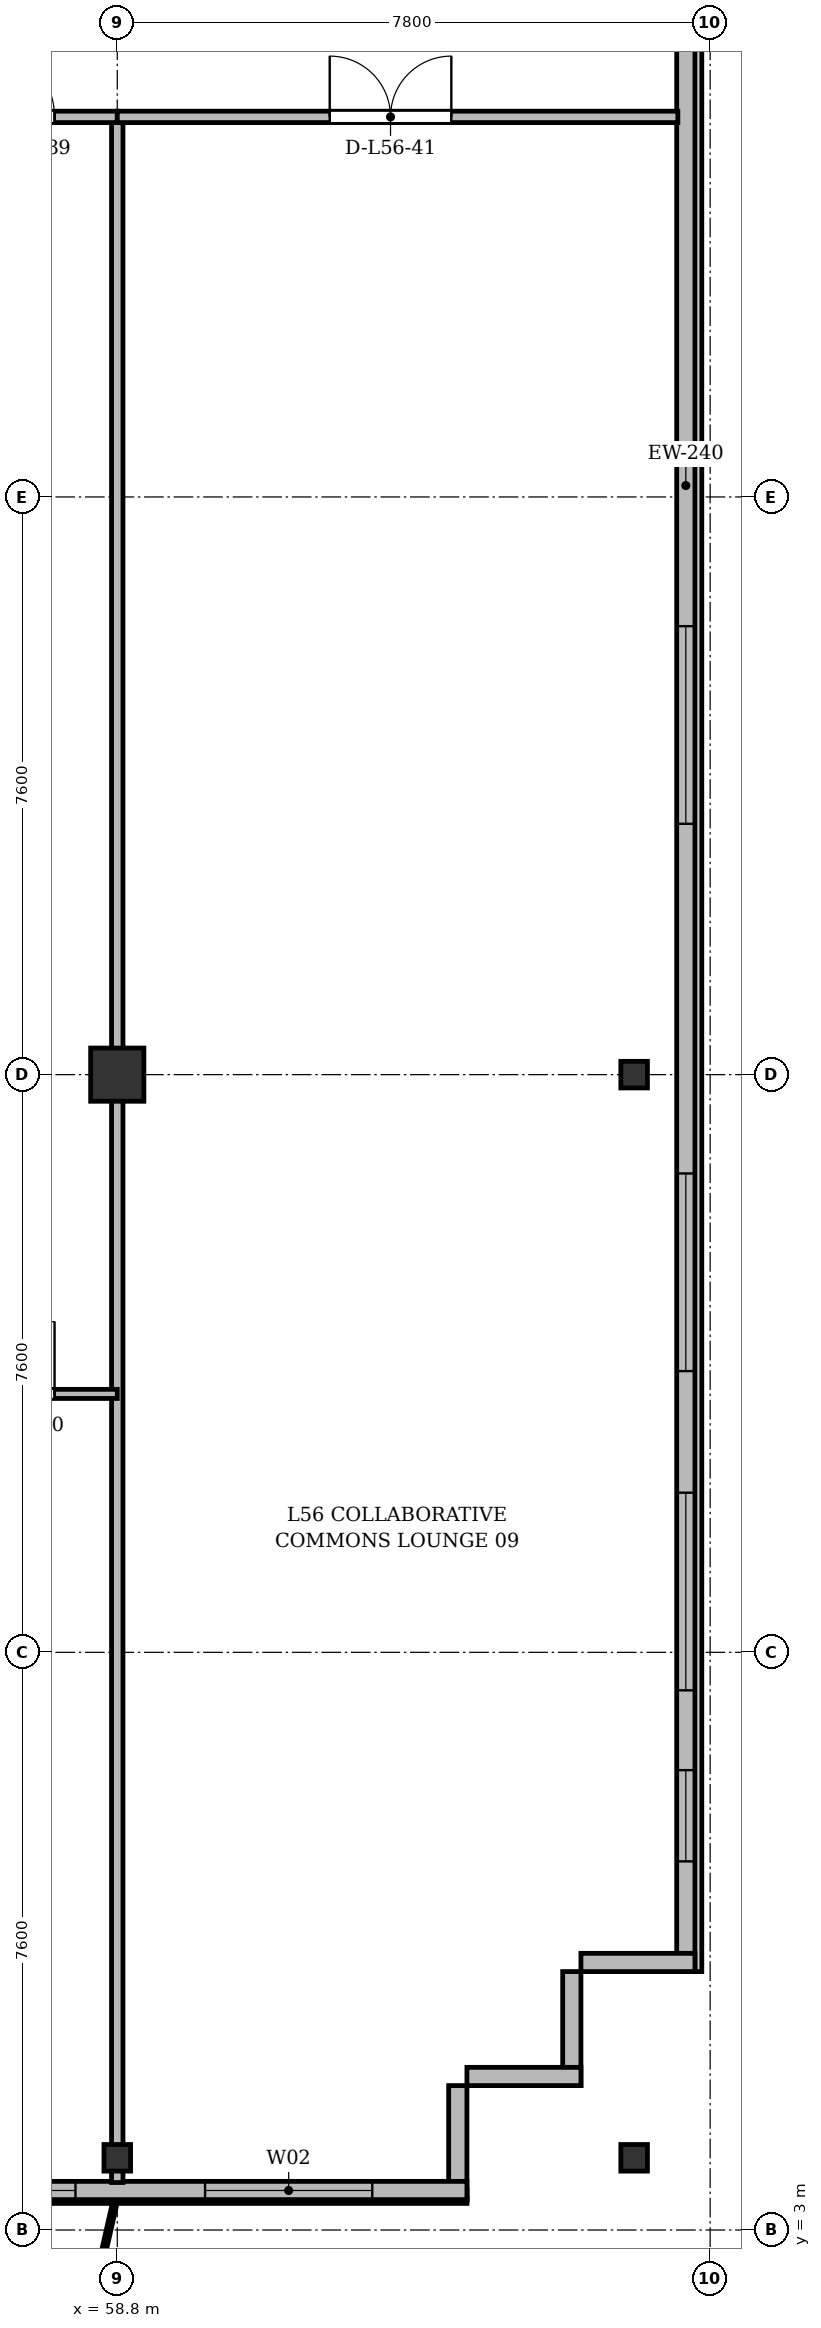
"""IFC4 building model, lengths in metres.
Left out: names, types, materials, properties, quantities, classifications, styles, units other than length and angle.
Written with IfcOpenShell. Run it as: python <this file> out.ifc"""

import sys

from ifc_helpers import new_model, si_unit, direction, frame, frame_2d, origin, origin_2d, place, context, subcontext, project, spatial, rectangle, i_section, extrude, source, transform, mapped, element, fill, save


model = new_model("IFC4")
c1 = context("Model", 3, precision=1e-05, world=origin(), true_north=direction((0.0, 1.0)))
c2 = subcontext(c1, "Body", "Model", "MODEL_VIEW")
j1 = project(units=[si_unit("LENGTHUNIT", "METRE"), si_unit("PLANEANGLEUNIT", "RADIAN")], contexts=[c1])
p1 = place(None, origin())
s1 = spatial("IfcSite", under=j1, at=p1, CompositionType="ELEMENT")
p2 = place(p1, origin())
s2 = spatial("IfcBuilding", under=s1, at=p2, CompositionType="ELEMENT")
p3 = place(p2, frame((0.0, 0.0, 215.7)))
s3 = spatial("IfcBuildingStorey", under=s2, at=p3, CompositionType="ELEMENT", Elevation=215.7)
m1 = source(origin(), c2, "Body", "SweptSolid", [
    extrude(i_section(OverallWidth=0.35, OverallDepth=0.35, WebThickness=0.018, FlangeThickness=0.028, at=origin_2d()), origin(), (0.0, 0.0, 1.0), 3.6),
])
p4 = place(p3, frame((58.8, 3.95, 0.0), z_axis=(0.0, 0.0, 1.0), x_axis=(1.0, 0.0, 0.0)))
e1 = element("IfcColumn", 1, at=p4, inside=s3, PredefinedType="COLUMN", context=c2, shape_type="MappedRepresentation", body=[
    mapped(m1, transform((0.0, 0.0, 0.0), x_axis=(1.0, 0.0, 0.0), y_axis=(0.0, 1.0, 0.0), z_axis=(0.0, 0.0, 1.0), scale=1.0)),
])
m2 = source(origin(), c2, "Body", "SweptSolid", [
    extrude(rectangle(XDim=0.7, YDim=0.7, at=origin_2d()), origin(), (0.0, 0.0, 1.0), 3.6),
])
p5 = place(p3, frame((58.8, 18.2, 0.0), z_axis=(0.0, 0.0, 1.0), x_axis=(1.0, 0.0, 0.0)))
e2 = element("IfcColumn", 2, at=p5, inside=s3, PredefinedType="COLUMN", context=c2, shape_type="MappedRepresentation", body=[
    mapped(m2, transform((0.0, 0.0, 0.0), x_axis=(1.0, 0.0, 0.0), y_axis=(0.0, 1.0, 0.0), z_axis=(0.0, 0.0, 1.0), scale=1.0)),
])
for number, where, z_axis, x_axis in (
    (3, (65.6, 3.95, 0.0), (0.0, 0.0, 1.0), (1.0, 0.0, 0.0)),
    (4, (65.6, 18.2, 0.0), (0.0, 0.0, 1.0), (1.0, 0.0, 0.0)),
):
    element("IfcColumn", number, at=place(p3, frame(where, z_axis=z_axis, x_axis=x_axis)), inside=s3, PredefinedType="COLUMN", context=c2, shape_type="MappedRepresentation", body=[
        mapped(m1, transform((0.0, 0.0, 0.0), x_axis=(1.0, 0.0, 0.0), y_axis=(0.0, 1.0, 0.0), z_axis=(0.0, 0.0, 1.0), scale=1.0)),
    ])
p6 = place(p3, frame((66.28, 45.5, 0.0), z_axis=(0.0, 0.0, 1.0), x_axis=(0.0, -1.0, 0.0)))
e5 = element("IfcWall", 5, at=p6, inside=s3, PredefinedType="SOLIDWALL", context=c2, shape_type="SweptSolid", body=[
    extrude(rectangle(XDim=39.1, YDim=0.24, at=frame_2d((19.55, 0.0))), origin(), (0.0, 0.0, 1.0), 3.36),
])
p7 = place(p6, frame((36.45, 0.0, 0.92)))
e6 = element("IfcOpeningElement", 6, at=p7, cuts=e5, PredefinedType="OPENING", context=c2, shape_type="SweptSolid", body=[
    extrude(rectangle(XDim=1.2, YDim=1.65, at=frame_2d((0.6, 0.825))), frame((0.0, 0.13, 0.0), z_axis=(0.0, -1.0, 0.0), x_axis=(1.0, 0.0, 0.0)), (0.0, 0.0, 1.0), 0.26),
])
p8 = place(p6, frame((32.8, 0.0, 0.92)))
e7 = element("IfcOpeningElement", 7, at=p8, cuts=e5, PredefinedType="OPENING", context=c2, shape_type="SweptSolid", body=[
    extrude(rectangle(XDim=2.6, YDim=1.9, at=frame_2d((1.3, 0.95))), frame((0.0, 0.13, 0.0), z_axis=(0.0, -1.0, 0.0), x_axis=(1.0, 0.0, 0.0)), (0.0, 0.0, 1.0), 0.26),
])
p9 = place(p6, frame((28.6, 0.0, 0.92)))
e8 = element("IfcOpeningElement", 8, at=p9, cuts=e5, PredefinedType="OPENING", context=c2, shape_type="SweptSolid", body=[
    extrude(rectangle(XDim=2.6, YDim=1.9, at=frame_2d((1.3, 0.95))), frame((0.0, 0.13, 0.0), z_axis=(0.0, -1.0, 0.0), x_axis=(1.0, 0.0, 0.0)), (0.0, 0.0, 1.0), 0.26),
])
p10 = place(p6, frame((21.4, 0.0, 0.92)))
e9 = element("IfcOpeningElement", 9, at=p10, cuts=e5, PredefinedType="OPENING", context=c2, shape_type="SweptSolid", body=[
    extrude(rectangle(XDim=2.6, YDim=1.9, at=frame_2d((1.3, 0.95))), frame((0.0, 0.13, 0.0), z_axis=(0.0, -1.0, 0.0), x_axis=(1.0, 0.0, 0.0)), (0.0, 0.0, 1.0), 0.26),
])
p11 = place(p6, frame((7.4, 0.0, 0.92)))
e10 = element("IfcOpeningElement", 10, at=p11, cuts=e5, PredefinedType="OPENING", context=c2, shape_type="SweptSolid", body=[
    extrude(rectangle(XDim=2.6, YDim=1.9, at=frame_2d((1.3, 0.95))), frame((0.0, 0.13, 0.0), z_axis=(0.0, -1.0, 0.0), x_axis=(1.0, 0.0, 0.0)), (0.0, 0.0, 1.0), 0.26),
])
p12 = place(p6, frame((4.5, 0.0, 0.92)))
e11 = element("IfcOpeningElement", 11, at=p12, cuts=e5, PredefinedType="OPENING", context=c2, shape_type="SweptSolid", body=[
    extrude(rectangle(XDim=1.2, YDim=1.65, at=frame_2d((0.6, 0.825))), frame((0.0, 0.13, 0.0), z_axis=(0.0, -1.0, 0.0), x_axis=(1.0, 0.0, 0.0)), (0.0, 0.0, 1.0), 0.26),
])
p13 = place(p6, frame((1.15, 0.0, 0.92)))
e12 = element("IfcOpeningElement", 12, at=p13, cuts=e5, PredefinedType="OPENING", context=c2, shape_type="SweptSolid", body=[
    extrude(rectangle(XDim=1.2, YDim=1.65, at=frame_2d((0.6, 0.825))), frame((0.0, 0.13, 0.0), z_axis=(0.0, -1.0, 0.0), x_axis=(1.0, 0.0, 0.0)), (0.0, 0.0, 1.0), 0.26),
])
p14 = place(p3, frame((66.4, 6.52, 0.0), z_axis=(0.0, 0.0, 1.0), x_axis=(-1.0, 0.0, 0.0)))
e13 = element("IfcWall", 13, at=p14, inside=s3, PredefinedType="SOLIDWALL", context=c2, shape_type="SweptSolid", body=[
    extrude(rectangle(XDim=1.5, YDim=0.24, at=frame_2d((0.75, 0.0))), origin(), (0.0, 0.0, 1.0), 2.86),
])
for number, where, z_axis, x_axis in (
    (14, (64.78, 6.4, 0.0), (0.0, 0.0, 1.0), (0.0, -1.0, 0.0)),
    (15, (64.9, 5.02, 0.0), (0.0, 0.0, 1.0), (-1.0, 0.0, 0.0)),
):
    element("IfcWall", number, at=place(p3, frame(where, z_axis=z_axis, x_axis=x_axis)), inside=s3, PredefinedType="SOLIDWALL", context=c2, shape_type="SweptSolid", body=[
        extrude(rectangle(XDim=1.5, YDim=0.24, at=frame_2d((0.75, 0.0))), origin(), (0.0, 0.0, 1.0), 3.36),
    ])
p15 = place(p3, frame((63.28, 4.9, 0.0), z_axis=(0.0, 0.0, 1.0), x_axis=(0.0, -1.0, 0.0)))
e16 = element("IfcWall", 16, at=p15, inside=s3, PredefinedType="SOLIDWALL", context=c2, shape_type="SweptSolid", body=[
    extrude(rectangle(XDim=1.5, YDim=0.24, at=frame_2d((0.75, 0.0))), origin(), (0.0, 0.0, 1.0), 2.91),
])
p16 = place(p3, frame((63.4, 3.52, 0.0), z_axis=(0.0, 0.0, 1.0), x_axis=(-1.0, 0.0, 0.0)))
e17 = element("IfcWall", 17, at=p16, inside=s3, PredefinedType="SOLIDWALL", context=c2, shape_type="SweptSolid", body=[
    extrude(rectangle(XDim=52.4, YDim=0.24, at=frame_2d((26.2, 0.0))), origin(), (0.0, 0.0, 1.0), 3.36),
])
p17 = place(p16, frame((1.245, 0.0, 0.9)))
e18 = element("IfcOpeningElement", 18, at=p17, cuts=e17, PredefinedType="OPENING", context=c2, shape_type="SweptSolid", body=[
    extrude(rectangle(XDim=2.2, YDim=1.8, at=frame_2d((1.1, 0.9))), frame((0.0, 0.13, 0.0), z_axis=(0.0, -1.0, 0.0), x_axis=(1.0, 0.0, 0.0)), (0.0, 0.0, 1.0), 0.26),
])
p18 = place(p16, frame((5.15, 0.0, 0.9)))
e19 = element("IfcOpeningElement", 19, at=p18, cuts=e17, PredefinedType="OPENING", context=c2, shape_type="SweptSolid", body=[
    extrude(rectangle(XDim=1.5, YDim=1.75, at=frame_2d((0.75, 0.875))), frame((0.0, 0.13, 0.0), z_axis=(0.0, -1.0, 0.0), x_axis=(1.0, 0.0, 0.0)), (0.0, 0.0, 1.0), 0.26),
])
p19 = place(p16, frame((7.45, 0.0, 0.9)))
e20 = element("IfcOpeningElement", 20, at=p19, cuts=e17, PredefinedType="OPENING", context=c2, shape_type="SweptSolid", body=[
    extrude(rectangle(XDim=1.5, YDim=1.75, at=frame_2d((0.75, 0.875))), frame((0.0, 0.13, 0.0), z_axis=(0.0, -1.0, 0.0), x_axis=(1.0, 0.0, 0.0)), (0.0, 0.0, 1.0), 0.26),
])
p20 = place(p16, frame((13.575, 0.0, 0.9)))
e21 = element("IfcOpeningElement", 21, at=p20, cuts=e17, PredefinedType="OPENING", context=c2, shape_type="SweptSolid", body=[
    extrude(rectangle(XDim=1.65, YDim=1.85, at=frame_2d((0.825, 0.925))), frame((0.0, 0.13, 0.0), z_axis=(0.0, -1.0, 0.0), x_axis=(1.0, 0.0, 0.0)), (0.0, 0.0, 1.0), 0.26),
])
p21 = place(p16, frame((25.3, 0.0, 0.9)))
e22 = element("IfcOpeningElement", 22, at=p21, cuts=e17, PredefinedType="OPENING", context=c2, shape_type="SweptSolid", body=[
    extrude(rectangle(XDim=1.8, YDim=1.8, at=frame_2d((0.9, 0.9))), frame((0.0, 0.13, 0.0), z_axis=(0.0, -1.0, 0.0), x_axis=(1.0, 0.0, 0.0)), (0.0, 0.0, 1.0), 0.26),
])
p22 = place(p16, frame((36.9, 0.0, 0.9)))
e23 = element("IfcOpeningElement", 23, at=p22, cuts=e17, PredefinedType="OPENING", context=c2, shape_type="SweptSolid", body=[
    extrude(rectangle(XDim=2.2, YDim=1.8, at=frame_2d((1.1, 0.9))), frame((0.0, 0.13, 0.0), z_axis=(0.0, -1.0, 0.0), x_axis=(1.0, 0.0, 0.0)), (0.0, 0.0, 1.0), 0.26),
])
p23 = place(p16, frame((43.45, 0.0, 0.9)))
e24 = element("IfcOpeningElement", 24, at=p23, cuts=e17, PredefinedType="OPENING", context=c2, shape_type="SweptSolid", body=[
    extrude(rectangle(XDim=1.5, YDim=1.75, at=frame_2d((0.75, 0.875))), frame((0.0, 0.13, 0.0), z_axis=(0.0, -1.0, 0.0), x_axis=(1.0, 0.0, 0.0)), (0.0, 0.0, 1.0), 0.26),
])
p24 = place(p16, frame((45.5, 0.0, 0.9)))
e25 = element("IfcOpeningElement", 25, at=p24, cuts=e17, PredefinedType="OPENING", context=c2, shape_type="SweptSolid", body=[
    extrude(rectangle(XDim=2.0, YDim=1.95, at=frame_2d((1.0, 0.975))), frame((0.0, 0.13, 0.0), z_axis=(0.0, -1.0, 0.0), x_axis=(1.0, 0.0, 0.0)), (0.0, 0.0, 1.0), 0.26),
])
p25 = place(p16, frame((49.23, 0.0, 0.9)))
e26 = element("IfcOpeningElement", 26, at=p25, cuts=e17, PredefinedType="OPENING", context=c2, shape_type="SweptSolid", body=[
    extrude(rectangle(XDim=1.65, YDim=1.85, at=frame_2d((0.825, 0.925))), frame((0.0, 0.13, 0.0), z_axis=(0.0, -1.0, 0.0), x_axis=(1.0, 0.0, 0.0)), (0.0, 0.0, 1.0), 0.26),
])
p26 = place(p3, frame((58.8, 3.625, 0.0), z_axis=(0.0, 0.0, 1.0), x_axis=(0.0, 1.0, 0.0)))
e27 = element("IfcWall", 27, at=p26, inside=s3, PredefinedType="PARTITIONING", context=c2, shape_type="SweptSolid", body=[
    extrude(rectangle(XDim=27.175, YDim=0.15, at=frame_2d((13.587, 0.0))), origin(), (0.0, 0.0, 1.0), 2.86),
])
p27 = place(p3, frame((56.2, 30.8, 0.0), z_axis=(0.0, 0.0, 1.0), x_axis=(1.0, 0.0, 0.0)))
e28 = element("IfcWall", 28, at=p27, inside=s3, PredefinedType="PARTITIONING", context=c2, shape_type="SweptSolid", body=[
    extrude(rectangle(XDim=2.6, YDim=0.15, at=frame_2d((1.3, 0.0))), origin(), (0.0, 0.0, 1.0), 2.86),
])
p28 = place(p27, frame((0.825, 0.0, 0.0)))
e29 = element("IfcOpeningElement", 29, at=p28, cuts=e28, PredefinedType="OPENING", context=c2, shape_type="SweptSolid", body=[
    extrude(rectangle(XDim=0.95, YDim=2.15, at=frame_2d((0.475, 1.075))), frame((0.0, 0.085, 0.0), z_axis=(0.0, -1.0, 0.0), x_axis=(1.0, 0.0, 0.0)), (0.0, 0.0, 1.0), 0.17),
])
p29 = place(p3, frame((56.2, 14.0, 0.0), z_axis=(0.0, 0.0, 1.0), x_axis=(1.0, 0.0, 0.0)))
e30 = element("IfcWall", 30, at=p29, inside=s3, PredefinedType="PARTITIONING", context=c2, shape_type="SweptSolid", body=[
    extrude(rectangle(XDim=2.6, YDim=0.12, at=frame_2d((1.3, 0.0))), origin(), (0.0, 0.0, 1.0), 2.86),
])
p30 = place(p29, frame((0.825, 0.0, 0.0)))
e31 = element("IfcOpeningElement", 31, at=p30, cuts=e30, PredefinedType="OPENING", context=c2, shape_type="SweptSolid", body=[
    extrude(rectangle(XDim=0.95, YDim=2.15, at=frame_2d((0.475, 1.075))), frame((0.0, 0.07, 0.0), z_axis=(0.0, -1.0, 0.0), x_axis=(1.0, 0.0, 0.0)), (0.0, 0.0, 1.0), 0.14),
])
p31 = place(p3, frame((58.8, 30.8, 0.0), z_axis=(0.0, 0.0, 1.0), x_axis=(1.0, 0.0, 0.0)))
e32 = element("IfcWall", 32, at=p31, inside=s3, PredefinedType="PARTITIONING", context=c2, shape_type="SweptSolid", body=[
    extrude(rectangle(XDim=7.375, YDim=0.15, at=frame_2d((3.688, 0.0))), origin(), (0.0, 0.0, 1.0), 2.86),
])
p32 = place(p31, frame((2.795, 0.0, 0.0)))
e33 = element("IfcOpeningElement", 33, at=p32, cuts=e32, PredefinedType="OPENING", context=c2, shape_type="SweptSolid", body=[
    extrude(rectangle(XDim=1.6, YDim=2.2, at=frame_2d((0.8, 1.1))), frame((0.0, 0.085, 0.0), z_axis=(0.0, -1.0, 0.0), x_axis=(1.0, 0.0, 0.0)), (0.0, 0.0, 1.0), 0.17),
])
m3 = source(origin(), c2, "Body", "SweptSolid", [
    extrude(rectangle(XDim=1.2, YDim=1.65, at=frame_2d((0.6, 0.825))), frame((0.0, 0.03, 0.0), z_axis=(0.0, -1.0, 0.0), x_axis=(1.0, 0.0, 0.0)), (0.0, 0.0, 1.0), 0.06),
])
p33 = place(p7, origin())
e34 = element("IfcWindow", 34, at=p33, inside=s3, PartitioningType="SINGLE_PANEL", PredefinedType="WINDOW", context=c2, shape_type="MappedRepresentation", body=[
    mapped(m3, transform((0.0, 0.0, 0.0), x_axis=(1.0, 0.0, 0.0), y_axis=(0.0, 1.0, 0.0), z_axis=(0.0, 0.0, 1.0), scale=1.0)),
])
fill(e6, e34)
m4 = source(origin(), c2, "Body", "SweptSolid", [
    extrude(rectangle(XDim=2.6, YDim=1.9, at=frame_2d((1.3, 0.95))), frame((0.0, 0.03, 0.0), z_axis=(0.0, -1.0, 0.0), x_axis=(1.0, 0.0, 0.0)), (0.0, 0.0, 1.0), 0.06),
])
p34 = place(p8, origin())
e35 = element("IfcWindow", 35, at=p34, inside=s3, PartitioningType="SINGLE_PANEL", PredefinedType="WINDOW", context=c2, shape_type="MappedRepresentation", body=[
    mapped(m4, transform((0.0, 0.0, 0.0), x_axis=(1.0, 0.0, 0.0), y_axis=(0.0, 1.0, 0.0), z_axis=(0.0, 0.0, 1.0), scale=1.0)),
])
fill(e7, e35)
p35 = place(p9, origin())
e36 = element("IfcWindow", 36, at=p35, inside=s3, PartitioningType="SINGLE_PANEL", PredefinedType="WINDOW", context=c2, shape_type="MappedRepresentation", body=[
    mapped(m4, transform((0.0, 0.0, 0.0), x_axis=(1.0, 0.0, 0.0), y_axis=(0.0, 1.0, 0.0), z_axis=(0.0, 0.0, 1.0), scale=1.0)),
])
fill(e8, e36)
p36 = place(p10, origin())
e37 = element("IfcWindow", 37, at=p36, inside=s3, PartitioningType="SINGLE_PANEL", PredefinedType="WINDOW", context=c2, shape_type="MappedRepresentation", body=[
    mapped(m4, transform((0.0, 0.0, 0.0), x_axis=(1.0, 0.0, 0.0), y_axis=(0.0, 1.0, 0.0), z_axis=(0.0, 0.0, 1.0), scale=1.0)),
])
fill(e9, e37)
m5 = source(origin(), c2, "Body", "SweptSolid", [
    extrude(rectangle(XDim=2.2, YDim=1.8, at=frame_2d((1.1, 0.9))), frame((0.0, 0.03, 0.0), z_axis=(0.0, -1.0, 0.0), x_axis=(1.0, 0.0, 0.0)), (0.0, 0.0, 1.0), 0.06),
])
p37 = place(p17, origin())
e38 = element("IfcWindow", 38, at=p37, inside=s3, PartitioningType="SINGLE_PANEL", PredefinedType="WINDOW", context=c2, shape_type="MappedRepresentation", body=[
    mapped(m5, transform((0.0, 0.0, 0.0), x_axis=(1.0, 0.0, 0.0), y_axis=(0.0, 1.0, 0.0), z_axis=(0.0, 0.0, 1.0), scale=1.0)),
])
fill(e18, e38)
m6 = source(origin(), c2, "Body", "SweptSolid", [
    extrude(rectangle(XDim=1.5, YDim=1.75, at=frame_2d((0.75, 0.875))), frame((0.0, 0.03, 0.0), z_axis=(0.0, -1.0, 0.0), x_axis=(1.0, 0.0, 0.0)), (0.0, 0.0, 1.0), 0.06),
])
p38 = place(p18, origin())
e39 = element("IfcWindow", 39, at=p38, inside=s3, PartitioningType="SINGLE_PANEL", PredefinedType="WINDOW", context=c2, shape_type="MappedRepresentation", body=[
    mapped(m6, transform((0.0, 0.0, 0.0), x_axis=(1.0, 0.0, 0.0), y_axis=(0.0, 1.0, 0.0), z_axis=(0.0, 0.0, 1.0), scale=1.0)),
])
fill(e19, e39)
m7 = source(origin(), c2, "Body", "SweptSolid", [
    extrude(rectangle(XDim=0.95, YDim=2.15, at=frame_2d((0.475, 1.075))), frame((0.0, 0.025, 0.0), z_axis=(0.0, -1.0, 0.0), x_axis=(1.0, 0.0, 0.0)), (0.0, 0.0, 1.0), 0.05),
])
p39 = place(p28, origin())
e40 = element("IfcDoor", 40, at=p39, inside=s3, OperationType="SINGLE_SWING_LEFT", PredefinedType="DOOR", context=c2, shape_type="MappedRepresentation", body=[
    mapped(m7, transform((0.0, 0.0, 0.0), x_axis=(1.0, 0.0, 0.0), y_axis=(0.0, 1.0, 0.0), z_axis=(0.0, 0.0, 1.0), scale=1.0)),
])
fill(e29, e40)
p40 = place(p30, origin())
e41 = element("IfcDoor", 41, at=p40, inside=s3, OperationType="SINGLE_SWING_RIGHT", PredefinedType="DOOR", context=c2, shape_type="MappedRepresentation", body=[
    mapped(m7, transform((0.0, 0.0, 0.0), x_axis=(1.0, 0.0, 0.0), y_axis=(0.0, 1.0, 0.0), z_axis=(0.0, 0.0, 1.0), scale=1.0)),
])
fill(e31, e41)
m8 = source(origin(), c2, "Body", "SweptSolid", [
    extrude(rectangle(XDim=1.6, YDim=2.2, at=frame_2d((0.8, 1.1))), frame((0.0, 0.025, 0.0), z_axis=(0.0, -1.0, 0.0), x_axis=(1.0, 0.0, 0.0)), (0.0, 0.0, 1.0), 0.05),
])
p41 = place(p32, origin())
e42 = element("IfcDoor", 42, at=p41, inside=s3, OperationType="DOUBLE_DOOR_SINGLE_SWING", PredefinedType="DOOR", context=c2, shape_type="MappedRepresentation", body=[
    mapped(m8, transform((0.0, 0.0, 0.0), x_axis=(1.0, 0.0, 0.0), y_axis=(0.0, 1.0, 0.0), z_axis=(0.0, 0.0, 1.0), scale=1.0)),
])
fill(e33, e42)
save(model, sys.argv[1])
